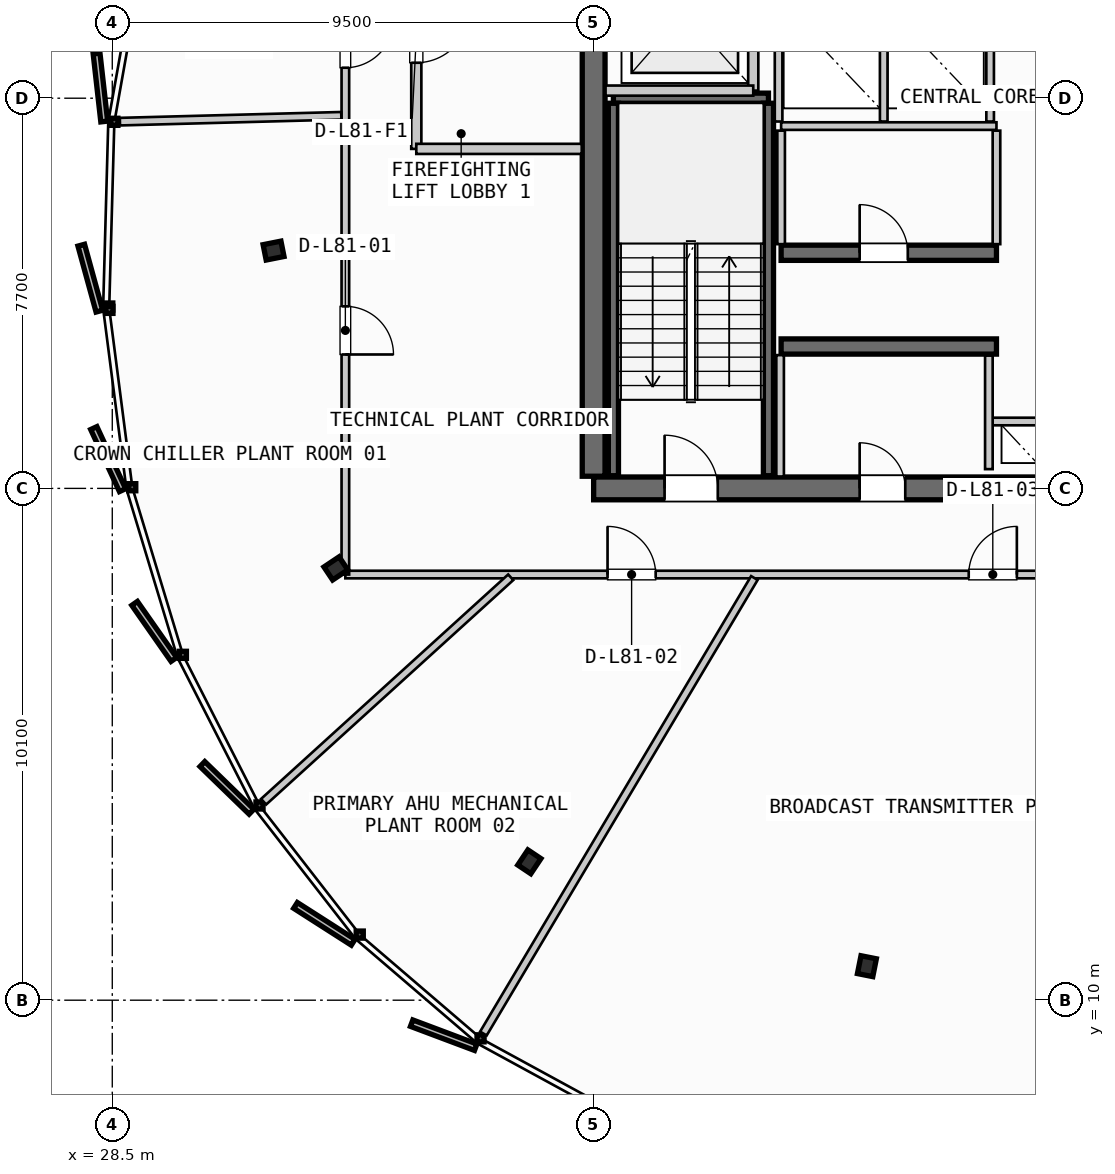
"""IFC4 building model, lengths in metres.
Left out: names, types, materials, properties, quantities, classifications, styles, units other than length and angle.
Written with IfcOpenShell. Run it as: python <this file> out.ifc"""

import sys

from ifc_helpers import new_model, si_unit, direction, frame, frame_2d, origin, origin_2d, place, context, subcontext, project, spatial, rectangle, i_section, extrude, source, transform, mapped, element, fill, save


model = new_model("IFC4")
c1 = context("Model", 3, precision=1e-05, world=origin(), true_north=direction((0.0, 1.0)))
c2 = subcontext(c1, "Body", "Model", "MODEL_VIEW")
j1 = project(units=[si_unit("LENGTHUNIT", "METRE"), si_unit("PLANEANGLEUNIT", "RADIAN")], contexts=[c1])
p1 = place(None, origin())
s1 = spatial("IfcSite", under=j1, at=p1, CompositionType="ELEMENT")
p2 = place(p1, origin())
s2 = spatial("IfcBuilding", under=s1, at=p2, CompositionType="ELEMENT")
p3 = place(p2, frame((0.0, 0.0, 304.3)))
s3 = spatial("IfcBuildingStorey", under=s2, at=p3, CompositionType="ELEMENT", Elevation=304.3)
p4 = place(p3, frame((38.0, 20.1, 0.0), z_axis=(0.0, 0.0, 1.0), x_axis=(1.0, 0.0, 0.0)))
e1 = element("IfcWall", 1, at=p4, inside=s3, PredefinedType="SHEAR", context=c2, shape_type="SweptSolid", body=[
    extrude(rectangle(XDim=17.6, YDim=0.45, at=frame_2d((8.8, 0.0))), origin(), (0.0, 0.0, 1.0), 3.735),
])
p5 = place(p4, frame((1.4, 0.0, 0.0)))
e2 = element("IfcOpeningElement", 2, at=p5, cuts=e1, PredefinedType="OPENING", context=c2, shape_type="SweptSolid", body=[
    extrude(rectangle(XDim=1.05, YDim=2.15, at=frame_2d((0.525, 1.075))), frame((0.0, 0.235, 0.0), z_axis=(0.0, -1.0, 0.0), x_axis=(1.0, 0.0, 0.0)), (0.0, 0.0, 1.0), 0.47),
])
p6 = place(p4, frame((15.15, 0.0, 0.0)))
e3 = element("IfcOpeningElement", 3, at=p6, cuts=e1, PredefinedType="OPENING", context=c2, shape_type="SweptSolid", body=[
    extrude(rectangle(XDim=1.05, YDim=2.15, at=frame_2d((0.525, 1.075))), frame((0.0, 0.235, 0.0), z_axis=(0.0, -1.0, 0.0), x_axis=(1.0, 0.0, 0.0)), (0.0, 0.0, 1.0), 0.47),
])
p7 = place(p4, frame((5.25, 0.0, 0.0)))
e4 = element("IfcOpeningElement", 4, at=p7, cuts=e1, PredefinedType="OPENING", context=c2, shape_type="SweptSolid", body=[
    extrude(rectangle(XDim=0.9, YDim=2.15, at=frame_2d((0.45, 1.075))), frame((0.0, 0.235, 0.0), z_axis=(0.0, -1.0, 0.0), x_axis=(1.0, 0.0, 0.0)), (0.0, 0.0, 1.0), 0.47),
])
p8 = place(p4, frame((11.4, 0.0, 0.0)))
e5 = element("IfcOpeningElement", 5, at=p8, cuts=e1, PredefinedType="OPENING", context=c2, shape_type="SweptSolid", body=[
    extrude(rectangle(XDim=0.95, YDim=2.15, at=frame_2d((0.475, 1.075))), frame((0.0, 0.235, 0.0), z_axis=(0.0, -1.0, 0.0), x_axis=(1.0, 0.0, 0.0)), (0.0, 0.0, 1.0), 0.47),
])
p9 = place(p3, frame((38.0, 35.26, 0.0), z_axis=(0.0, 0.0, 1.0), x_axis=(0.0, -1.0, 0.0)))
e6 = element("IfcWall", 6, at=p9, inside=s3, PredefinedType="SHEAR", context=c2, shape_type="SweptSolid", body=[
    extrude(rectangle(XDim=14.92, YDim=0.45, at=frame_2d((7.46, 0.0))), origin(), (0.0, 0.0, 1.0), 3.735),
])
p10 = place(p9, frame((5.21, 0.0, 0.0)))
e7 = element("IfcOpeningElement", 7, at=p10, cuts=e6, PredefinedType="OPENING", context=c2, shape_type="SweptSolid", body=[
    extrude(rectangle(XDim=1.1, YDim=2.2, at=frame_2d((0.55, 1.1))), frame((0.0, 0.235, 0.0), z_axis=(0.0, -1.0, 0.0), x_axis=(1.0, 0.0, 0.0)), (0.0, 0.0, 1.0), 0.47),
])
p11 = place(p3, frame((41.7, 22.9, 0.0), z_axis=(0.0, 0.0, 1.0), x_axis=(1.0, 0.0, 0.0)))
e8 = element("IfcWall", 8, at=p11, inside=s3, PredefinedType="SHEAR", context=c2, shape_type="SweptSolid", body=[
    extrude(rectangle(XDim=4.25, YDim=0.3, at=frame_2d((2.125, 0.0))), origin(), (0.0, 0.0, 1.0), 3.735),
])
p12 = place(p3, frame((41.7, 24.75, 0.0), z_axis=(0.0, 0.0, 1.0), x_axis=(1.0, 0.0, 0.0)))
e9 = element("IfcWall", 9, at=p12, inside=s3, PredefinedType="SHEAR", context=c2, shape_type="SweptSolid", body=[
    extrude(rectangle(XDim=4.25, YDim=0.3, at=frame_2d((2.125, 0.0))), origin(), (0.0, 0.0, 1.0), 3.735),
])
p13 = place(p12, frame((1.55, 0.0, 0.0)))
e10 = element("IfcOpeningElement", 10, at=p13, cuts=e9, PredefinedType="OPENING", context=c2, shape_type="SweptSolid", body=[
    extrude(rectangle(XDim=0.95, YDim=2.15, at=frame_2d((0.475, 1.075))), frame((0.0, 0.16, 0.0), z_axis=(0.0, -1.0, 0.0), x_axis=(1.0, 0.0, 0.0)), (0.0, 0.0, 1.0), 0.32),
])
m1 = source(origin(), c2, "Body", "SweptSolid", [
    extrude(i_section(OverallWidth=0.309, OverallDepth=0.359, WebThickness=0.016, FlangeThickness=0.026, FilletRadius=0.027, at=origin_2d()), origin(), (0.0, 0.0, 1.0), 3.735),
])
for number, where, z_axis, x_axis in (
    (11, (31.683, 24.793, 0.0), (0.0, 0.0, 1.0), (-0.981, -0.195, 0.0)),
    (12, (32.913, 18.521, 0.0), (0.0, 0.0, 1.0), (-0.831, -0.556, 0.0)),
    (13, (36.731, 12.731, 0.0), (0.0, 0.0, 1.0), (-0.556, -0.831, 0.0)),
    (14, (43.393, 10.671, 0.0), (0.0, 0.0, 1.0), (-0.195, -0.981, 0.0)),
):
    element("IfcColumn", number, at=place(p3, frame(where, z_axis=z_axis, x_axis=x_axis)), inside=s3, PredefinedType="COLUMN", context=c2, shape_type="MappedRepresentation", body=[
        mapped(m1, transform((0.0, 0.0, 0.0), scale=1.0)),
    ])
p14 = place(p3, frame((38.39, 27.8, 0.0), z_axis=(0.0, 0.0, 1.0), x_axis=(1.0, 0.0, 0.0)))
e15 = element("IfcWall", 15, at=p14, inside=s3, PredefinedType="SHEAR", context=c2, shape_type="SweptSolid", body=[
    extrude(rectangle(XDim=3.06, YDim=0.2, at=frame_2d((1.53, 0.0))), origin(), (0.0, 0.0, 1.0), 3.735),
])
for number, where, z_axis, x_axis in (
    (16, (41.45, 27.7, 0.0), (0.0, 0.0, 1.0), (0.0, -1.0, 0.0)),
    (17, (38.39, 20.35, 0.0), (0.0, 0.0, 1.0), (0.0, 1.0, 0.0)),
):
    element("IfcWall", number, at=place(p3, frame(where, z_axis=z_axis, x_axis=x_axis)), inside=s3, PredefinedType="SHEAR", context=c2, shape_type="SweptSolid", body=[
        extrude(rectangle(XDim=7.35, YDim=0.2, at=frame_2d((3.675, 0.0))), origin(), (0.0, 0.0, 1.0), 3.735),
    ])
p15 = place(p3, frame((45.8, 21.42, 0.0), z_axis=(0.0, 0.0, 1.0), x_axis=(1.0, 0.0, 0.0)))
e18 = element("IfcWall", 18, at=p15, inside=s3, PredefinedType="PARTITIONING", context=c2, shape_type="SweptSolid", body=[
    extrude(rectangle(XDim=2.0, YDim=0.15, at=frame_2d((1.0, 0.0))), origin(), (0.0, 0.0, 1.0), 3.26),
])
p16 = place(p3, frame((45.8, 20.48, 0.0), z_axis=(0.0, 0.0, 1.0), x_axis=(0.0, 1.0, 0.0)))
e19 = element("IfcWall", 19, at=p16, inside=s3, PredefinedType="PARTITIONING", context=c2, shape_type="SweptSolid", body=[
    extrude(rectangle(XDim=2.24, YDim=0.15, at=frame_2d((1.12, 0.0))), origin(), (0.0, 0.0, 1.0), 3.26),
])
p17 = place(p3, frame((41.15, 27.95, 0.0), z_axis=(0.0, 0.0, 1.0), x_axis=(0.0, 1.0, 0.0)))
e20 = element("IfcWall", 20, at=p17, inside=s3, PredefinedType="PARTITIONING", context=c2, shape_type="SweptSolid", body=[
    extrude(rectangle(XDim=3.1, YDim=0.2, at=frame_2d((1.55, 0.0))), origin(), (0.0, 0.0, 1.0), 3.26),
])
p18 = place(p3, frame((38.235, 27.95, 0.0), z_axis=(0.0, 0.0, 1.0), x_axis=(1.0, 0.0, 0.0)))
e21 = element("IfcWall", 21, at=p18, inside=s3, PredefinedType="PARTITIONING", context=c2, shape_type="SweptSolid", body=[
    extrude(rectangle(XDim=2.915, YDim=0.2, at=frame_2d((1.458, 0.0))), origin(), (0.0, 0.0, 1.0), 3.26),
])
p19 = place(p3, frame((34.5, 31.2, 0.0), z_axis=(0.0, 0.0, 1.0), x_axis=(0.0, -1.0, 0.0)))
e22 = element("IfcWall", 22, at=p19, inside=s3, PredefinedType="PARTITIONING", context=c2, shape_type="SweptSolid", body=[
    extrude(rectangle(XDim=4.4, YDim=0.2, at=frame_2d((2.2, 0.0))), origin(), (0.0, 0.0, 1.0), 3.26),
])
p20 = place(p19, frame((1.65, 0.0, 0.0)))
e23 = element("IfcOpeningElement", 23, at=p20, cuts=e22, PredefinedType="OPENING", context=c2, shape_type="SweptSolid", body=[
    extrude(rectangle(XDim=1.05, YDim=2.15, at=frame_2d((0.525, 1.075))), frame((0.0, 0.11, 0.0), z_axis=(0.0, -1.0, 0.0), x_axis=(1.0, 0.0, 0.0)), (0.0, 0.0, 1.0), 0.22),
])
p21 = place(p3, frame((34.5, 26.8, 0.0), z_axis=(0.0, 0.0, 1.0), x_axis=(1.0, 0.0, 0.0)))
e24 = element("IfcWall", 24, at=p21, inside=s3, PredefinedType="PARTITIONING", context=c2, shape_type="SweptSolid", body=[
    extrude(rectangle(XDim=3.265, YDim=0.2, at=frame_2d((1.632, 0.0))), origin(), (0.0, 0.0, 1.0), 3.26),
])
p22 = place(p3, frame((41.68, 20.335, 0.0), z_axis=(0.0, 0.0, 1.0), x_axis=(0.0, 1.0, 0.0)))
e25 = element("IfcWall", 25, at=p22, inside=s3, PredefinedType="PARTITIONING", context=c2, shape_type="SweptSolid", body=[
    extrude(rectangle(XDim=2.395, YDim=0.15, at=frame_2d((1.198, 0.0))), origin(), (0.0, 0.0, 1.0), 3.26),
])
p23 = place(p3, frame((41.7, 27.25, 0.0), z_axis=(0.0, 0.0, 1.0), x_axis=(1.0, 0.0, 0.0)))
e26 = element("IfcWall", 26, at=p23, inside=s3, PredefinedType="PARTITIONING", context=c2, shape_type="SweptSolid", body=[
    extrude(rectangle(XDim=4.25, YDim=0.15, at=frame_2d((2.125, 0.0))), origin(), (0.0, 0.0, 1.0), 3.26),
])
for number, where, z_axis, x_axis in (
    (27, (41.7, 24.92, 0.0), (0.0, 0.0, 1.0), (0.0, 1.0, 0.0)),
    (28, (45.95, 24.92, 0.0), (0.0, 0.0, 1.0), (0.0, 1.0, 0.0)),
):
    element("IfcWall", number, at=place(p3, frame(where, z_axis=z_axis, x_axis=x_axis)), inside=s3, PredefinedType="PARTITIONING", context=c2, shape_type="SweptSolid", body=[
        extrude(rectangle(XDim=2.24, YDim=0.15, at=frame_2d((1.12, 0.0))), origin(), (0.0, 0.0, 1.0), 3.26),
    ])
for number, where, z_axis, x_axis in (
    (29, (41.65, 27.34, 0.0), (0.0, 0.0, 1.0), (0.0, 1.0, 0.0)),
    (30, (43.725, 27.34, 0.0), (0.0, 0.0, 1.0), (0.0, 1.0, 0.0)),
    (31, (45.825, 27.34, 0.0), (0.0, 0.0, 1.0), (0.0, 1.0, 0.0)),
):
    element("IfcWall", number, at=place(p3, frame(where, z_axis=z_axis, x_axis=x_axis)), inside=s3, PredefinedType="PARTITIONING", context=c2, shape_type="SweptSolid", body=[
        extrude(rectangle(XDim=2.34, YDim=0.15, at=frame_2d((1.17, 0.0))), origin(), (0.0, 0.0, 1.0), 3.26),
    ])
p24 = place(p3, frame((33.1, 18.4, 0.0), z_axis=(0.0, 0.0, 1.0), x_axis=(1.0, 0.0, 0.0)))
e32 = element("IfcWall", 32, at=p24, inside=s3, PredefinedType="PARTITIONING", context=c2, shape_type="SweptSolid", body=[
    extrude(rectangle(XDim=27.4, YDim=0.15, at=frame_2d((13.7, 0.0))), origin(), (0.0, 0.0, 1.0), 3.26),
])
p25 = place(p24, frame((5.174, 0.0, 0.0)))
e33 = element("IfcOpeningElement", 33, at=p25, cuts=e32, PredefinedType="OPENING", context=c2, shape_type="SweptSolid", body=[
    extrude(rectangle(XDim=0.95, YDim=2.15, at=frame_2d((0.475, 1.075))), frame((0.0, 0.085, 0.0), z_axis=(0.0, -1.0, 0.0), x_axis=(1.0, 0.0, 0.0)), (0.0, 0.0, 1.0), 0.17),
])
p26 = place(p24, frame((12.302, 0.0, 0.0)))
e34 = element("IfcOpeningElement", 34, at=p26, cuts=e32, PredefinedType="OPENING", context=c2, shape_type="SweptSolid", body=[
    extrude(rectangle(XDim=0.95, YDim=2.15, at=frame_2d((0.475, 1.075))), frame((0.0, 0.085, 0.0), z_axis=(0.0, -1.0, 0.0), x_axis=(1.0, 0.0, 0.0)), (0.0, 0.0, 1.0), 0.17),
])
p27 = place(p24, frame((21.668, 0.0, 0.0)))
e35 = element("IfcOpeningElement", 35, at=p27, cuts=e32, PredefinedType="OPENING", context=c2, shape_type="SweptSolid", body=[
    extrude(rectangle(XDim=0.95, YDim=2.15, at=frame_2d((0.475, 1.075))), frame((0.0, 0.085, 0.0), z_axis=(0.0, -1.0, 0.0), x_axis=(1.0, 0.0, 0.0)), (0.0, 0.0, 1.0), 0.17),
])
p28 = place(p3, frame((33.1, 37.2, 0.0), z_axis=(0.0, 0.0, 1.0), x_axis=(0.0, -1.0, 0.0)))
e36 = element("IfcWall", 36, at=p28, inside=s3, PredefinedType="PARTITIONING", context=c2, shape_type="SweptSolid", body=[
    extrude(rectangle(XDim=18.8, YDim=0.15, at=frame_2d((9.4, 0.0))), origin(), (0.0, 0.0, 1.0), 3.26),
])
p29 = place(p28, frame((13.507, 0.0, 0.0)))
e37 = element("IfcOpeningElement", 37, at=p29, cuts=e36, PredefinedType="OPENING", context=c2, shape_type="SweptSolid", body=[
    extrude(rectangle(XDim=0.95, YDim=2.15, at=frame_2d((0.475, 1.075))), frame((0.0, 0.085, 0.0), z_axis=(0.0, -1.0, 0.0), x_axis=(1.0, 0.0, 0.0)), (0.0, 0.0, 1.0), 0.17),
])
p30 = place(p28, frame((7.848, 0.0, 0.0)))
e38 = element("IfcOpeningElement", 38, at=p30, cuts=e36, PredefinedType="OPENING", context=c2, shape_type="SweptSolid", body=[
    extrude(rectangle(XDim=0.95, YDim=2.15, at=frame_2d((0.475, 1.075))), frame((0.0, 0.085, 0.0), z_axis=(0.0, -1.0, 0.0), x_axis=(1.0, 0.0, 0.0)), (0.0, 0.0, 1.0), 0.17),
])
p31 = place(p3, frame((33.02, 27.453, 0.0), z_axis=(0.0, 0.0, 1.0), x_axis=(-0.999647940646, -0.026532899632, 0.0)))
e39 = element("IfcWall", 39, at=p31, inside=s3, PredefinedType="PARTITIONING", context=c2, shape_type="SweptSolid", body=[
    extrude(rectangle(XDim=4.371, YDim=0.15, at=frame_2d((2.185, 0.0))), origin(), (0.0, 0.0, 1.0), 3.26),
])
p32 = place(p3, frame((36.364, 18.346, 0.0), z_axis=(0.0, 0.0, 1.0), x_axis=(-0.74023680204, -0.672346247781, 0.0)))
e40 = element("IfcWall", 40, at=p32, inside=s3, PredefinedType="PARTITIONING", context=c2, shape_type="SweptSolid", body=[
    extrude(rectangle(XDim=6.588, YDim=0.15, at=frame_2d((3.294, 0.0))), origin(), (0.0, 0.0, 1.0), 3.26),
])
p33 = place(p3, frame((41.172, 18.331, 0.0), z_axis=(0.0, 0.0, 1.0), x_axis=(-0.511265536161, -0.859422801381, 0.0)))
e41 = element("IfcWall", 41, at=p33, inside=s3, PredefinedType="PARTITIONING", context=c2, shape_type="SweptSolid", body=[
    extrude(rectangle(XDim=10.46, YDim=0.15, at=frame_2d((5.23, 0.0))), origin(), (0.0, 0.0, 1.0), 3.26),
])
m2 = source(origin(), c2, "Body", "SweptSolid", [
    extrude(rectangle(XDim=1.05, YDim=2.15, at=frame_2d((0.525, 1.075))), frame((0.0, 0.025, 0.0), z_axis=(0.0, -1.0, 0.0), x_axis=(1.0, 0.0, 0.0)), (0.0, 0.0, 1.0), 0.05),
])
p34 = place(p5, origin())
e42 = element("IfcDoor", 42, at=p34, inside=s3, OperationType="SINGLE_SWING_LEFT", PredefinedType="DOOR", context=c2, shape_type="MappedRepresentation", body=[
    mapped(m2, transform((0.0, 0.0, 0.0), scale=1.0)),
])
fill(e2, e42)
m3 = source(origin(), c2, "Body", "SweptSolid", [
    extrude(rectangle(XDim=0.9, YDim=2.15, at=frame_2d((0.45, 1.075))), frame((0.0, 0.025, 0.0), z_axis=(0.0, -1.0, 0.0), x_axis=(1.0, 0.0, 0.0)), (0.0, 0.0, 1.0), 0.05),
])
p35 = place(p7, origin())
e43 = element("IfcDoor", 43, at=p35, inside=s3, OperationType="SINGLE_SWING_LEFT", PredefinedType="DOOR", context=c2, shape_type="MappedRepresentation", body=[
    mapped(m3, transform((0.0, 0.0, 0.0), scale=1.0)),
])
fill(e4, e43)
m4 = source(origin(), c2, "Body", "SweptSolid", [
    extrude(rectangle(XDim=0.95, YDim=2.15, at=frame_2d((0.475, 1.075))), frame((0.0, 0.025, 0.0), z_axis=(0.0, -1.0, 0.0), x_axis=(1.0, 0.0, 0.0)), (0.0, 0.0, 1.0), 0.05),
])
p36 = place(p13, origin())
e44 = element("IfcDoor", 44, at=p36, inside=s3, OperationType="SINGLE_SWING_LEFT", PredefinedType="DOOR", context=c2, shape_type="MappedRepresentation", body=[
    mapped(m4, transform((0.0, 0.0, 0.0), scale=1.0)),
])
fill(e10, e44)
p37 = place(p20, origin())
e45 = element("IfcDoor", 45, at=p37, inside=s3, OperationType="SINGLE_SWING_LEFT", PredefinedType="DOOR", context=c2, shape_type="MappedRepresentation", body=[
    mapped(m2, transform((0.0, 0.0, 0.0), scale=1.0)),
])
fill(e23, e45)
p38 = place(p25, origin())
e46 = element("IfcDoor", 46, at=p38, inside=s3, OperationType="SINGLE_SWING_LEFT", PredefinedType="DOOR", context=c2, shape_type="MappedRepresentation", body=[
    mapped(m4, transform((0.0, 0.0, 0.0), scale=1.0)),
])
fill(e33, e46)
p39 = place(p26, origin())
e47 = element("IfcDoor", 47, at=p39, inside=s3, OperationType="SINGLE_SWING_RIGHT", PredefinedType="DOOR", context=c2, shape_type="MappedRepresentation", body=[
    mapped(m4, transform((0.0, 0.0, 0.0), scale=1.0)),
])
fill(e34, e47)
p40 = place(p29, origin())
e48 = element("IfcDoor", 48, at=p40, inside=s3, OperationType="SINGLE_SWING_RIGHT", PredefinedType="DOOR", context=c2, shape_type="MappedRepresentation", body=[
    mapped(m4, transform((0.0, 0.0, 0.0), scale=1.0)),
])
fill(e37, e48)
p41 = place(p30, origin())
e49 = element("IfcDoor", 49, at=p41, inside=s3, OperationType="SINGLE_SWING_LEFT", PredefinedType="DOOR", context=c2, shape_type="MappedRepresentation", body=[
    mapped(m4, transform((0.0, 0.0, 0.0), scale=1.0)),
])
fill(e38, e49)
save(model, sys.argv[1])
